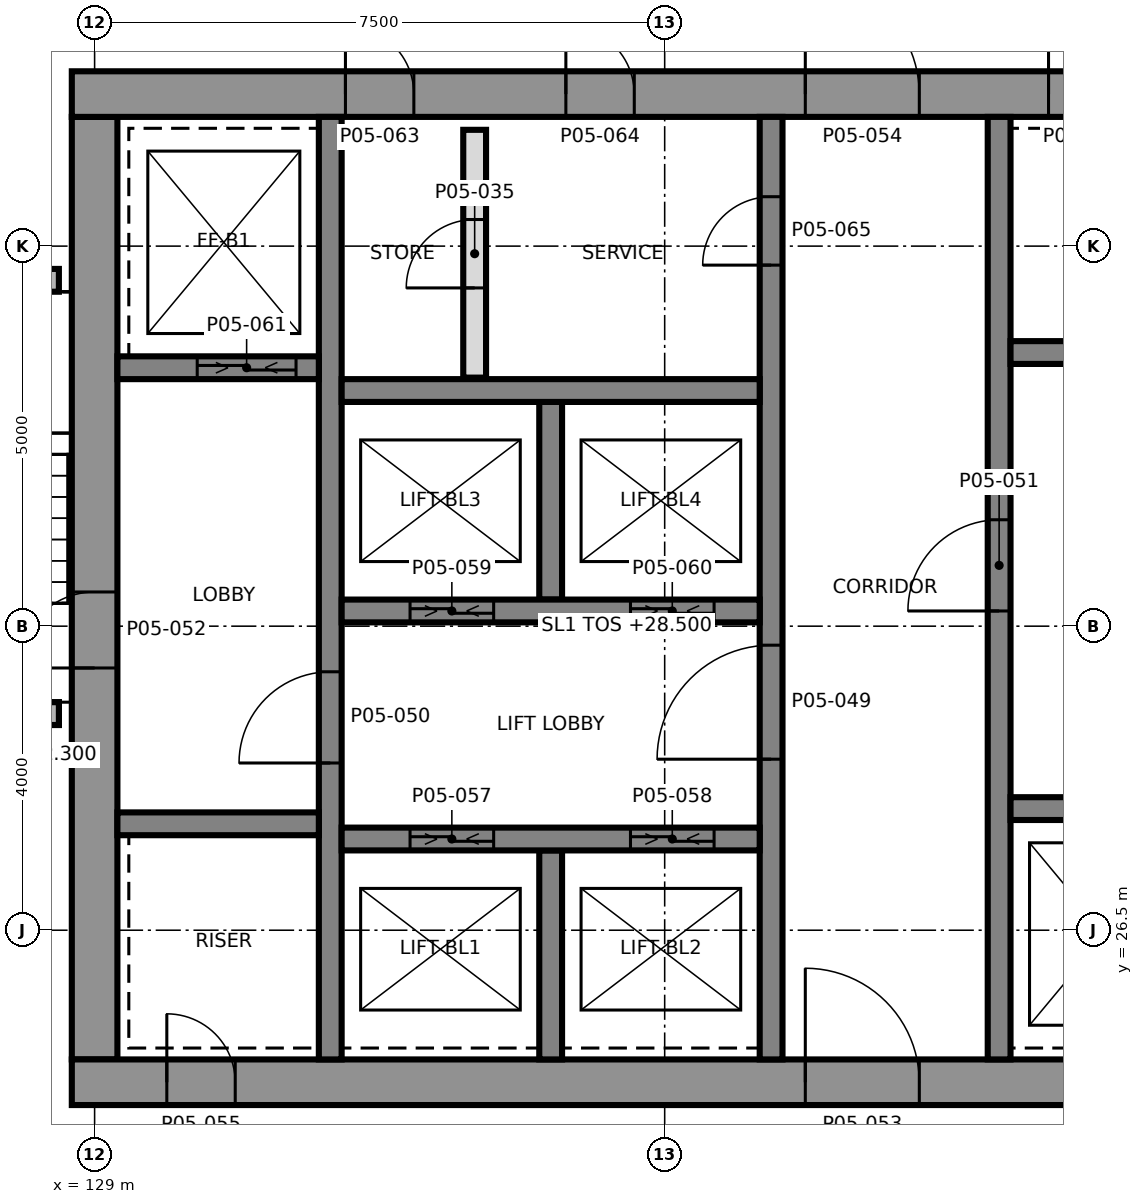
"""IFC4 building model, lengths in metres.
Left out: names, types, materials, properties, quantities, classifications, styles, units other than length and angle.
Written with IfcOpenShell. Run it as: python <this file> out.ifc"""

import sys

from ifc_helpers import new_model, si_unit, direction, frame, frame_2d, origin, place, context, subcontext, project, spatial, rectangle, extrude, element, fill, save


model = new_model("IFC4")
c1 = context("Model", 3, precision=1e-05, world=origin(), true_north=direction((0.0, 1.0)))
c2 = subcontext(c1, "Body", "Model", "MODEL_VIEW")
j1 = project(units=[si_unit("LENGTHUNIT", "METRE"), si_unit("PLANEANGLEUNIT", "RADIAN")], contexts=[c1])
p1 = place(None, origin())
s1 = spatial("IfcSite", under=j1, at=p1, CompositionType="ELEMENT")
p2 = place(p1, origin())
s2 = spatial("IfcBuilding", under=s1, at=p2, CompositionType="ELEMENT")
p3 = place(p2, frame((0.0, 0.0, 28.5)))
s3 = spatial("IfcBuildingStorey", under=s2, at=p3, CompositionType="ELEMENT", Elevation=28.5)
p4 = place(p3, frame((129.0, 24.8, 0.0), z_axis=(0.0, 0.0, 1.0), x_axis=(0.0, 1.0, 0.0)))
e1 = element("IfcWall", 1, at=p4, inside=s3, PredefinedType="SHEAR", context=c2, shape_type="SweptSolid", body=[
    extrude(rectangle(XDim=12.4, YDim=0.6, at=frame_2d((6.2, 0.0))), origin(), (0.0, 0.0, 1.0), 5.0),
])
p5 = place(p4, frame((5.15, 0.0, 0.0)))
e2 = element("IfcOpeningElement", 2, at=p5, cuts=e1, PredefinedType="OPENING", context=c2, shape_type="SweptSolid", body=[
    extrude(rectangle(XDim=1.0, YDim=2.1, at=frame_2d((0.5, 1.05))), frame((0.0, 0.31, 0.0), z_axis=(0.0, -1.0, 0.0), x_axis=(1.0, 0.0, 0.0)), (0.0, 0.0, 1.0), 0.62),
])
p6 = place(p3, frame((128.7, 24.5, 0.0), z_axis=(0.0, 0.0, 1.0), x_axis=(1.0, 0.0, 0.0)))
e3 = element("IfcWall", 3, at=p6, inside=s3, PredefinedType="SHEAR", context=c2, shape_type="SweptSolid", body=[
    extrude(rectangle(XDim=15.0, YDim=0.6, at=frame_2d((7.5, 0.0))), origin(), (0.0, 0.0, 1.0), 5.0),
])
p7 = place(p6, frame((9.65, 0.0, 0.0)))
e4 = element("IfcOpeningElement", 4, at=p7, cuts=e3, PredefinedType="OPENING", context=c2, shape_type="SweptSolid", body=[
    extrude(rectangle(XDim=1.5, YDim=2.1, at=frame_2d((0.75, 1.05))), frame((0.0, 0.31, 0.0), z_axis=(0.0, -1.0, 0.0), x_axis=(1.0, 0.0, 0.0)), (0.0, 0.0, 1.0), 0.62),
])
p8 = place(p6, frame((1.25, 0.0, 0.0)))
e5 = element("IfcOpeningElement", 5, at=p8, cuts=e3, PredefinedType="OPENING", context=c2, shape_type="SweptSolid", body=[
    extrude(rectangle(XDim=0.9, YDim=2.1, at=frame_2d((0.45, 1.05))), frame((0.0, 0.31, 0.0), z_axis=(0.0, -1.0, 0.0), x_axis=(1.0, 0.0, 0.0)), (0.0, 0.0, 1.0), 0.62),
])
p9 = place(p3, frame((128.7, 37.5, 0.0), z_axis=(0.0, 0.0, 1.0), x_axis=(1.0, 0.0, 0.0)))
e6 = element("IfcWall", 6, at=p9, inside=s3, PredefinedType="SHEAR", context=c2, shape_type="SweptSolid", body=[
    extrude(rectangle(XDim=15.0, YDim=0.6, at=frame_2d((7.5, 0.0))), origin(), (0.0, 0.0, 1.0), 5.0),
])
p10 = place(p9, frame((9.65, 0.0, 0.0)))
e7 = element("IfcOpeningElement", 7, at=p10, cuts=e6, PredefinedType="OPENING", context=c2, shape_type="SweptSolid", body=[
    extrude(rectangle(XDim=1.5, YDim=2.1, at=frame_2d((0.75, 1.05))), frame((0.0, 0.31, 0.0), z_axis=(0.0, -1.0, 0.0), x_axis=(1.0, 0.0, 0.0)), (0.0, 0.0, 1.0), 0.62),
])
p11 = place(p9, frame((12.85, 0.0, 0.0)))
e8 = element("IfcOpeningElement", 8, at=p11, cuts=e6, PredefinedType="OPENING", context=c2, shape_type="SweptSolid", body=[
    extrude(rectangle(XDim=0.9, YDim=2.1, at=frame_2d((0.45, 1.05))), frame((0.0, 0.31, 0.0), z_axis=(0.0, -1.0, 0.0), x_axis=(1.0, 0.0, 0.0)), (0.0, 0.0, 1.0), 0.62),
])
p12 = place(p9, frame((3.6, 0.0, 0.0)))
e9 = element("IfcOpeningElement", 9, at=p12, cuts=e6, PredefinedType="OPENING", context=c2, shape_type="SweptSolid", body=[
    extrude(rectangle(XDim=0.9, YDim=2.1, at=frame_2d((0.45, 1.05))), frame((0.0, 0.31, 0.0), z_axis=(0.0, -1.0, 0.0), x_axis=(1.0, 0.0, 0.0)), (0.0, 0.0, 1.0), 0.62),
])
p13 = place(p9, frame((6.5, 0.0, 0.0)))
e10 = element("IfcOpeningElement", 10, at=p13, cuts=e6, PredefinedType="OPENING", context=c2, shape_type="SweptSolid", body=[
    extrude(rectangle(XDim=0.9, YDim=2.1, at=frame_2d((0.45, 1.05))), frame((0.0, 0.31, 0.0), z_axis=(0.0, -1.0, 0.0), x_axis=(1.0, 0.0, 0.0)), (0.0, 0.0, 1.0), 0.62),
])
p14 = place(p3, frame((132.1, 24.8, 0.0), z_axis=(0.0, 0.0, 1.0), x_axis=(0.0, 1.0, 0.0)))
e11 = element("IfcWall", 11, at=p14, inside=s3, PredefinedType="SHEAR", context=c2, shape_type="SweptSolid", body=[
    extrude(rectangle(XDim=12.4, YDim=0.3, at=frame_2d((6.2, 0.0))), origin(), (0.0, 0.0, 1.0), 5.0),
])
p15 = place(p14, frame((3.9, 0.0, 0.0)))
e12 = element("IfcOpeningElement", 12, at=p15, cuts=e11, PredefinedType="OPENING", context=c2, shape_type="SweptSolid", body=[
    extrude(rectangle(XDim=1.2, YDim=2.1, at=frame_2d((0.6, 1.05))), frame((0.0, 0.16, 0.0), z_axis=(0.0, -1.0, 0.0), x_axis=(1.0, 0.0, 0.0)), (0.0, 0.0, 1.0), 0.32),
])
p16 = place(p3, frame((137.9, 24.8, 0.0), z_axis=(0.0, 0.0, 1.0), x_axis=(0.0, 1.0, 0.0)))
e13 = element("IfcWall", 13, at=p16, inside=s3, PredefinedType="SHEAR", context=c2, shape_type="SweptSolid", body=[
    extrude(rectangle(XDim=12.4, YDim=0.3, at=frame_2d((6.2, 0.0))), origin(), (0.0, 0.0, 1.0), 5.0),
])
p17 = place(p16, frame((3.95, 0.0, 0.0)))
e14 = element("IfcOpeningElement", 14, at=p17, cuts=e13, PredefinedType="OPENING", context=c2, shape_type="SweptSolid", body=[
    extrude(rectangle(XDim=1.5, YDim=2.1, at=frame_2d((0.75, 1.05))), frame((0.0, 0.16, 0.0), z_axis=(0.0, -1.0, 0.0), x_axis=(1.0, 0.0, 0.0)), (0.0, 0.0, 1.0), 0.32),
])
p18 = place(p16, frame((10.45, 0.0, 0.0)))
e15 = element("IfcOpeningElement", 15, at=p18, cuts=e13, PredefinedType="OPENING", context=c2, shape_type="SweptSolid", body=[
    extrude(rectangle(XDim=0.9, YDim=2.1, at=frame_2d((0.45, 1.05))), frame((0.0, 0.16, 0.0), z_axis=(0.0, -1.0, 0.0), x_axis=(1.0, 0.0, 0.0)), (0.0, 0.0, 1.0), 0.32),
])
p19 = place(p3, frame((140.9, 24.8, 0.0), z_axis=(0.0, 0.0, 1.0), x_axis=(0.0, 1.0, 0.0)))
e16 = element("IfcWall", 16, at=p19, inside=s3, PredefinedType="SHEAR", context=c2, shape_type="SweptSolid", body=[
    extrude(rectangle(XDim=12.4, YDim=0.3, at=frame_2d((6.2, 0.0))), origin(), (0.0, 0.0, 1.0), 5.0),
])
p20 = place(p19, frame((5.9, 0.0, 0.0)))
e17 = element("IfcOpeningElement", 17, at=p20, cuts=e16, PredefinedType="OPENING", context=c2, shape_type="SweptSolid", body=[
    extrude(rectangle(XDim=1.2, YDim=2.1, at=frame_2d((0.6, 1.05))), frame((0.0, 0.16, 0.0), z_axis=(0.0, -1.0, 0.0), x_axis=(1.0, 0.0, 0.0)), (0.0, 0.0, 1.0), 0.32),
])
p21 = place(p3, frame((135.0, 24.8, 0.0), z_axis=(0.0, 0.0, 1.0), x_axis=(0.0, 1.0, 0.0)))
e18 = element("IfcWall", 18, at=p21, inside=s3, PredefinedType="SHEAR", context=c2, shape_type="SweptSolid", body=[
    extrude(rectangle(XDim=2.75, YDim=0.3, at=frame_2d((1.375, 0.0))), origin(), (0.0, 0.0, 1.0), 5.0),
])
p22 = place(p3, frame((135.0, 30.85, 0.0), z_axis=(0.0, 0.0, 1.0), x_axis=(0.0, 1.0, 0.0)))
e19 = element("IfcWall", 19, at=p22, inside=s3, PredefinedType="SHEAR", context=c2, shape_type="SweptSolid", body=[
    extrude(rectangle(XDim=2.6, YDim=0.3, at=frame_2d((1.3, 0.0))), origin(), (0.0, 0.0, 1.0), 5.0),
])
p23 = place(p3, frame((132.25, 27.7, 0.0), z_axis=(0.0, 0.0, 1.0), x_axis=(1.0, 0.0, 0.0)))
e20 = element("IfcWall", 20, at=p23, inside=s3, PredefinedType="SHEAR", context=c2, shape_type="SweptSolid", body=[
    extrude(rectangle(XDim=5.5, YDim=0.3, at=frame_2d((2.75, 0.0))), origin(), (0.0, 0.0, 1.0), 5.0),
])
p24 = place(p23, frame((0.9, 0.0, 0.0)))
e21 = element("IfcOpeningElement", 21, at=p24, cuts=e20, PredefinedType="OPENING", context=c2, shape_type="SweptSolid", body=[
    extrude(rectangle(XDim=1.1, YDim=2.4, at=frame_2d((0.55, 1.2))), frame((0.0, 0.16, 0.0), z_axis=(0.0, -1.0, 0.0), x_axis=(1.0, 0.0, 0.0)), (0.0, 0.0, 1.0), 0.32),
])
p25 = place(p23, frame((3.8, 0.0, 0.0)))
e22 = element("IfcOpeningElement", 22, at=p25, cuts=e20, PredefinedType="OPENING", context=c2, shape_type="SweptSolid", body=[
    extrude(rectangle(XDim=1.1, YDim=2.4, at=frame_2d((0.55, 1.2))), frame((0.0, 0.16, 0.0), z_axis=(0.0, -1.0, 0.0), x_axis=(1.0, 0.0, 0.0)), (0.0, 0.0, 1.0), 0.32),
])
p26 = place(p3, frame((132.25, 30.7, 0.0), z_axis=(0.0, 0.0, 1.0), x_axis=(1.0, 0.0, 0.0)))
e23 = element("IfcWall", 23, at=p26, inside=s3, PredefinedType="SHEAR", context=c2, shape_type="SweptSolid", body=[
    extrude(rectangle(XDim=5.5, YDim=0.3, at=frame_2d((2.75, 0.0))), origin(), (0.0, 0.0, 1.0), 5.0),
])
p27 = place(p26, frame((0.9, 0.0, 0.0)))
e24 = element("IfcOpeningElement", 24, at=p27, cuts=e23, PredefinedType="OPENING", context=c2, shape_type="SweptSolid", body=[
    extrude(rectangle(XDim=1.1, YDim=2.4, at=frame_2d((0.55, 1.2))), frame((0.0, 0.16, 0.0), z_axis=(0.0, -1.0, 0.0), x_axis=(1.0, 0.0, 0.0)), (0.0, 0.0, 1.0), 0.32),
])
p28 = place(p26, frame((3.8, 0.0, 0.0)))
e25 = element("IfcOpeningElement", 25, at=p28, cuts=e23, PredefinedType="OPENING", context=c2, shape_type="SweptSolid", body=[
    extrude(rectangle(XDim=1.1, YDim=2.4, at=frame_2d((0.55, 1.2))), frame((0.0, 0.16, 0.0), z_axis=(0.0, -1.0, 0.0), x_axis=(1.0, 0.0, 0.0)), (0.0, 0.0, 1.0), 0.32),
])
p29 = place(p3, frame((132.25, 33.6, 0.0), z_axis=(0.0, 0.0, 1.0), x_axis=(1.0, 0.0, 0.0)))
e26 = element("IfcWall", 26, at=p29, inside=s3, PredefinedType="SHEAR", context=c2, shape_type="SweptSolid", body=[
    extrude(rectangle(XDim=5.5, YDim=0.3, at=frame_2d((2.75, 0.0))), origin(), (0.0, 0.0, 1.0), 5.0),
])
p30 = place(p3, frame((129.3, 27.9, 0.0), z_axis=(0.0, 0.0, 1.0), x_axis=(1.0, 0.0, 0.0)))
e27 = element("IfcWall", 27, at=p30, inside=s3, PredefinedType="SHEAR", context=c2, shape_type="SweptSolid", body=[
    extrude(rectangle(XDim=2.65, YDim=0.3, at=frame_2d((1.325, 0.0))), origin(), (0.0, 0.0, 1.0), 5.0),
])
p31 = place(p3, frame((129.3, 33.9, 0.0), z_axis=(0.0, 0.0, 1.0), x_axis=(1.0, 0.0, 0.0)))
e28 = element("IfcWall", 28, at=p31, inside=s3, PredefinedType="SHEAR", context=c2, shape_type="SweptSolid", body=[
    extrude(rectangle(XDim=2.65, YDim=0.3, at=frame_2d((1.325, 0.0))), origin(), (0.0, 0.0, 1.0), 5.0),
])
p32 = place(p31, frame((1.05, 0.0, 0.0)))
e29 = element("IfcOpeningElement", 29, at=p32, cuts=e28, PredefinedType="OPENING", context=c2, shape_type="SweptSolid", body=[
    extrude(rectangle(XDim=1.3, YDim=2.4, at=frame_2d((0.65, 1.2))), frame((0.0, 0.16, 0.0), z_axis=(0.0, -1.0, 0.0), x_axis=(1.0, 0.0, 0.0)), (0.0, 0.0, 1.0), 0.32),
])
p33 = place(p3, frame((141.05, 28.1, 0.0), z_axis=(0.0, 0.0, 1.0), x_axis=(1.0, 0.0, 0.0)))
e30 = element("IfcWall", 30, at=p33, inside=s3, PredefinedType="SHEAR", context=c2, shape_type="SweptSolid", body=[
    extrude(rectangle(XDim=2.65, YDim=0.3, at=frame_2d((1.325, 0.0))), origin(), (0.0, 0.0, 1.0), 5.0),
])
p34 = place(p33, frame((0.75, 0.0, 0.0)))
e31 = element("IfcOpeningElement", 31, at=p34, cuts=e30, PredefinedType="OPENING", context=c2, shape_type="SweptSolid", body=[
    extrude(rectangle(XDim=1.3, YDim=2.4, at=frame_2d((0.65, 1.2))), frame((0.0, 0.16, 0.0), z_axis=(0.0, -1.0, 0.0), x_axis=(1.0, 0.0, 0.0)), (0.0, 0.0, 1.0), 0.32),
])
p35 = place(p3, frame((141.05, 34.1, 0.0), z_axis=(0.0, 0.0, 1.0), x_axis=(1.0, 0.0, 0.0)))
e32 = element("IfcWall", 32, at=p35, inside=s3, PredefinedType="SHEAR", context=c2, shape_type="SweptSolid", body=[
    extrude(rectangle(XDim=2.65, YDim=0.3, at=frame_2d((1.325, 0.0))), origin(), (0.0, 0.0, 1.0), 5.0),
])
p36 = place(p3, frame((125.7, 29.35, 0.0), z_axis=(0.0, 0.0, 1.0), x_axis=(1.0, 0.0, 0.0)))
e33 = element("IfcWall", 33, at=p36, inside=s3, PredefinedType="SHEAR", context=c2, shape_type="SweptSolid", body=[
    extrude(rectangle(XDim=2.83, YDim=0.3, at=frame_2d((1.415, 0.0))), origin(), (0.0, 0.0, 1.0), 3.8),
])
p37 = place(p36, frame((0.975, 0.0, 0.0)))
e34 = element("IfcOpeningElement", 34, at=p37, cuts=e33, PredefinedType="OPENING", context=c2, shape_type="SweptSolid", body=[
    extrude(rectangle(XDim=1.2, YDim=2.1, at=frame_2d((0.6, 1.05))), frame((0.0, 0.16, 0.0), z_axis=(0.0, -1.0, 0.0), x_axis=(1.0, 0.0, 0.0)), (0.0, 0.0, 1.0), 0.32),
])
p38 = place(p3, frame((114.6, 35.05, 0.0), z_axis=(0.0, 0.0, 1.0), x_axis=(1.0, 0.0, 0.0)))
e35 = element("IfcWall", 35, at=p38, inside=s3, PredefinedType="SHEAR", context=c2, shape_type="SweptSolid", body=[
    extrude(rectangle(XDim=13.93, YDim=0.3, at=frame_2d((6.965, 0.0))), origin(), (0.0, 0.0, 1.0), 4.65),
])
p39 = place(p38, frame((5.13, 0.0, 0.0)))
e36 = element("IfcOpeningElement", 36, at=p39, cuts=e35, PredefinedType="OPENING", context=c2, shape_type="SweptSolid", body=[
    extrude(rectangle(XDim=1.0, YDim=2.1, at=frame_2d((0.5, 1.05))), frame((0.0, 0.16, 0.0), z_axis=(0.0, -1.0, 0.0), x_axis=(1.0, 0.0, 0.0)), (0.0, 0.0, 1.0), 0.32),
])
p40 = place(p3, frame((134.0, 33.77, 0.0), z_axis=(0.0, 0.0, 1.0), x_axis=(0.0, 1.0, 0.0)))
e37 = element("IfcWall", 37, at=p40, inside=s3, PredefinedType="PARTITIONING", context=c2, shape_type="SweptSolid", body=[
    extrude(rectangle(XDim=3.26, YDim=0.3, at=frame_2d((1.63, 0.0))), origin(), (0.0, 0.0, 1.0), 3.8),
])
p41 = place(p40, frame((1.18, 0.0, 0.0)))
e38 = element("IfcOpeningElement", 38, at=p41, cuts=e37, PredefinedType="OPENING", context=c2, shape_type="SweptSolid", body=[
    extrude(rectangle(XDim=0.9, YDim=2.1, at=frame_2d((0.45, 1.05))), frame((0.0, 0.16, 0.0), z_axis=(0.0, -1.0, 0.0), x_axis=(1.0, 0.0, 0.0)), (0.0, 0.0, 1.0), 0.32),
])
p42 = place(p3, frame((125.85, 29.35, 3.8), z_axis=(0.0, 0.0, 1.0), x_axis=(1.0, 0.0, 0.0)))
e39 = element("IfcWall", 39, at=p42, inside=s3, PredefinedType="SHEAR", context=c2, shape_type="SweptSolid", body=[
    extrude(rectangle(XDim=2.68, YDim=0.3, at=frame_2d((1.34, 0.0))), origin(), (0.0, 0.0, 1.0), 0.9),
])
p43 = place(p41, origin())
e40 = element("IfcDoor", 40, at=p43, inside=s3, OperationType="SINGLE_SWING_LEFT", PredefinedType="DOOR", context=c2, shape_type="SweptSolid", body=[
    extrude(rectangle(XDim=0.9, YDim=2.1, at=frame_2d((0.45, 1.05))), frame((0.0, 0.025, 0.0), z_axis=(0.0, -1.0, 0.0), x_axis=(1.0, 0.0, 0.0)), (0.0, 0.0, 1.0), 0.05),
])
fill(e38, e40)
p44 = place(p17, origin())
e41 = element("IfcDoor", 41, at=p44, inside=s3, OperationType="SINGLE_SWING_RIGHT", PredefinedType="DOOR", context=c2, shape_type="SweptSolid", body=[
    extrude(rectangle(XDim=1.5, YDim=2.1, at=frame_2d((0.75, 1.05))), frame((0.0, 0.025, 0.0), z_axis=(0.0, -1.0, 0.0), x_axis=(1.0, 0.0, 0.0)), (0.0, 0.0, 1.0), 0.05),
])
fill(e14, e41)
p45 = place(p15, origin())
e42 = element("IfcDoor", 42, at=p45, inside=s3, OperationType="SINGLE_SWING_LEFT", PredefinedType="DOOR", context=c2, shape_type="SweptSolid", body=[
    extrude(rectangle(XDim=1.2, YDim=2.1, at=frame_2d((0.6, 1.05))), frame((0.0, 0.025, 0.0), z_axis=(0.0, -1.0, 0.0), x_axis=(1.0, 0.0, 0.0)), (0.0, 0.0, 1.0), 0.05),
])
fill(e12, e42)
p46 = place(p20, origin())
e43 = element("IfcDoor", 43, at=p46, inside=s3, OperationType="SINGLE_SWING_RIGHT", PredefinedType="DOOR", context=c2, shape_type="SweptSolid", body=[
    extrude(rectangle(XDim=1.2, YDim=2.1, at=frame_2d((0.6, 1.05))), frame((0.0, 0.025, 0.0), z_axis=(0.0, -1.0, 0.0), x_axis=(1.0, 0.0, 0.0)), (0.0, 0.0, 1.0), 0.05),
])
fill(e17, e43)
p47 = place(p5, origin())
e44 = element("IfcDoor", 44, at=p47, inside=s3, OperationType="SINGLE_SWING_RIGHT", PredefinedType="DOOR", context=c2, shape_type="SweptSolid", body=[
    extrude(rectangle(XDim=1.0, YDim=2.1, at=frame_2d((0.5, 1.05))), frame((0.0, 0.025, 0.0), z_axis=(0.0, -1.0, 0.0), x_axis=(1.0, 0.0, 0.0)), (0.0, 0.0, 1.0), 0.05),
])
fill(e2, e44)
p48 = place(p7, origin())
e45 = element("IfcDoor", 45, at=p48, inside=s3, OperationType="SINGLE_SWING_LEFT", PredefinedType="DOOR", context=c2, shape_type="SweptSolid", body=[
    extrude(rectangle(XDim=1.5, YDim=2.1, at=frame_2d((0.75, 1.05))), frame((0.0, 0.025, 0.0), z_axis=(0.0, -1.0, 0.0), x_axis=(1.0, 0.0, 0.0)), (0.0, 0.0, 1.0), 0.05),
])
fill(e4, e45)
p49 = place(p10, origin())
e46 = element("IfcDoor", 46, at=p49, inside=s3, OperationType="SINGLE_SWING_RIGHT", PredefinedType="DOOR", context=c2, shape_type="SweptSolid", body=[
    extrude(rectangle(XDim=1.5, YDim=2.1, at=frame_2d((0.75, 1.05))), frame((0.0, 0.025, 0.0), z_axis=(0.0, -1.0, 0.0), x_axis=(1.0, 0.0, 0.0)), (0.0, 0.0, 1.0), 0.05),
])
fill(e7, e46)
p50 = place(p8, origin())
e47 = element("IfcDoor", 47, at=p50, inside=s3, OperationType="SINGLE_SWING_LEFT", PredefinedType="DOOR", context=c2, shape_type="SweptSolid", body=[
    extrude(rectangle(XDim=0.9, YDim=2.1, at=frame_2d((0.45, 1.05))), frame((0.0, 0.025, 0.0), z_axis=(0.0, -1.0, 0.0), x_axis=(1.0, 0.0, 0.0)), (0.0, 0.0, 1.0), 0.05),
])
fill(e5, e47)
p51 = place(p11, origin())
e48 = element("IfcDoor", 48, at=p51, inside=s3, OperationType="SINGLE_SWING_RIGHT", PredefinedType="DOOR", context=c2, shape_type="SweptSolid", body=[
    extrude(rectangle(XDim=0.9, YDim=2.1, at=frame_2d((0.45, 1.05))), frame((0.0, 0.025, 0.0), z_axis=(0.0, -1.0, 0.0), x_axis=(1.0, 0.0, 0.0)), (0.0, 0.0, 1.0), 0.05),
])
fill(e8, e48)
p52 = place(p24, origin())
e49 = element("IfcDoor", 49, at=p52, inside=s3, OperationType="SLIDING_TO_LEFT", PredefinedType="DOOR", context=c2, shape_type="SweptSolid", body=[
    extrude(rectangle(XDim=1.1, YDim=2.4, at=frame_2d((0.55, 1.2))), frame((0.0, 0.025, 0.0), z_axis=(0.0, -1.0, 0.0), x_axis=(1.0, 0.0, 0.0)), (0.0, 0.0, 1.0), 0.05),
])
fill(e21, e49)
p53 = place(p25, origin())
e50 = element("IfcDoor", 50, at=p53, inside=s3, OperationType="SLIDING_TO_LEFT", PredefinedType="DOOR", context=c2, shape_type="SweptSolid", body=[
    extrude(rectangle(XDim=1.1, YDim=2.4, at=frame_2d((0.55, 1.2))), frame((0.0, 0.025, 0.0), z_axis=(0.0, -1.0, 0.0), x_axis=(1.0, 0.0, 0.0)), (0.0, 0.0, 1.0), 0.05),
])
fill(e22, e50)
p54 = place(p27, origin())
e51 = element("IfcDoor", 51, at=p54, inside=s3, OperationType="SLIDING_TO_LEFT", PredefinedType="DOOR", context=c2, shape_type="SweptSolid", body=[
    extrude(rectangle(XDim=1.1, YDim=2.4, at=frame_2d((0.55, 1.2))), frame((0.0, 0.025, 0.0), z_axis=(0.0, -1.0, 0.0), x_axis=(1.0, 0.0, 0.0)), (0.0, 0.0, 1.0), 0.05),
])
fill(e24, e51)
p55 = place(p28, origin())
e52 = element("IfcDoor", 52, at=p55, inside=s3, OperationType="SLIDING_TO_LEFT", PredefinedType="DOOR", context=c2, shape_type="SweptSolid", body=[
    extrude(rectangle(XDim=1.1, YDim=2.4, at=frame_2d((0.55, 1.2))), frame((0.0, 0.025, 0.0), z_axis=(0.0, -1.0, 0.0), x_axis=(1.0, 0.0, 0.0)), (0.0, 0.0, 1.0), 0.05),
])
fill(e25, e52)
p56 = place(p32, origin())
e53 = element("IfcDoor", 53, at=p56, inside=s3, OperationType="SLIDING_TO_LEFT", PredefinedType="DOOR", context=c2, shape_type="SweptSolid", body=[
    extrude(rectangle(XDim=1.3, YDim=2.4, at=frame_2d((0.65, 1.2))), frame((0.0, 0.025, 0.0), z_axis=(0.0, -1.0, 0.0), x_axis=(1.0, 0.0, 0.0)), (0.0, 0.0, 1.0), 0.05),
])
fill(e29, e53)
p57 = place(p12, origin())
e54 = element("IfcDoor", 54, at=p57, inside=s3, OperationType="SINGLE_SWING_LEFT", PredefinedType="DOOR", context=c2, shape_type="SweptSolid", body=[
    extrude(rectangle(XDim=0.9, YDim=2.1, at=frame_2d((0.45, 1.05))), frame((0.0, 0.025, 0.0), z_axis=(0.0, -1.0, 0.0), x_axis=(1.0, 0.0, 0.0)), (0.0, 0.0, 1.0), 0.05),
])
fill(e9, e54)
p58 = place(p13, origin())
e55 = element("IfcDoor", 55, at=p58, inside=s3, OperationType="SINGLE_SWING_RIGHT", PredefinedType="DOOR", context=c2, shape_type="SweptSolid", body=[
    extrude(rectangle(XDim=0.9, YDim=2.1, at=frame_2d((0.45, 1.05))), frame((0.0, 0.025, 0.0), z_axis=(0.0, -1.0, 0.0), x_axis=(1.0, 0.0, 0.0)), (0.0, 0.0, 1.0), 0.05),
])
fill(e10, e55)
p59 = place(p18, origin())
e56 = element("IfcDoor", 56, at=p59, inside=s3, OperationType="SINGLE_SWING_RIGHT", PredefinedType="DOOR", context=c2, shape_type="SweptSolid", body=[
    extrude(rectangle(XDim=0.9, YDim=2.1, at=frame_2d((0.45, 1.05))), frame((0.0, 0.025, 0.0), z_axis=(0.0, -1.0, 0.0), x_axis=(1.0, 0.0, 0.0)), (0.0, 0.0, 1.0), 0.05),
])
fill(e15, e56)
save(model, sys.argv[1])
